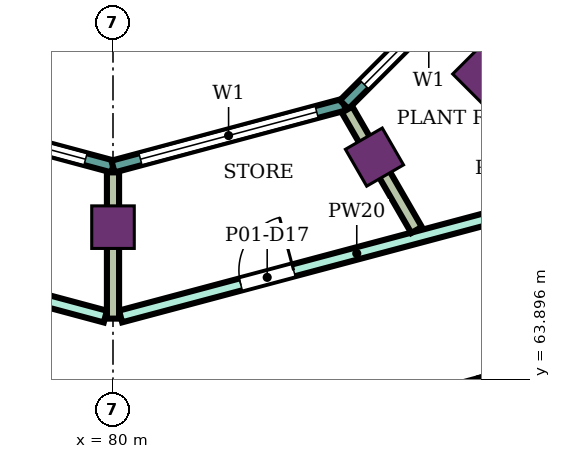
"""IFC4 building model, lengths in metres.
Left out: names, types, materials, properties, quantities, classifications, styles, units other than length and angle.
Written with IfcOpenShell. Run it as: python <this file> out.ifc"""

import sys

from ifc_helpers import new_model, si_unit, direction, frame, frame_2d, origin, origin_2d, place, context, subcontext, project, spatial, rectangle, extrude, element, fill, save


model = new_model("IFC4")
c1 = context("Model", 3, precision=1e-05, world=origin(), true_north=direction((0.0, 1.0)))
c2 = subcontext(c1, "Body", "Model", "MODEL_VIEW")
j1 = project(units=[si_unit("LENGTHUNIT", "METRE"), si_unit("PLANEANGLEUNIT", "RADIAN")], contexts=[c1])
p1 = place(None, origin())
s1 = spatial("IfcSite", under=j1, at=p1, CompositionType="ELEMENT")
p2 = place(p1, origin())
s2 = spatial("IfcBuilding", under=s1, at=p2, CompositionType="ELEMENT")
p3 = place(p2, frame((0.0, 0.0, 270.9)))
s3 = spatial("IfcBuildingStorey", under=s2, at=p3, CompositionType="ELEMENT", Elevation=270.9)
for number, where, z_axis, x_axis in (
    (1, (80.0, 66.4, 0.0), (0.0, 0.0, 1.0), (0.0, -1.0, 0.0)),
    (2, (84.3, 67.552, 0.0), (0.0, 0.0, 1.0), (0.5, -0.866, 0.0)),
    (3, (86.081, 68.919, 0.0), (0.0, 0.0, 1.0), (0.707, -0.707, 0.0)),
):
    element("IfcColumn", number, at=place(p3, frame(where, z_axis=z_axis, x_axis=x_axis)), inside=s3, PredefinedType="COLUMN", context=c2, shape_type="SweptSolid", body=[
        extrude(rectangle(XDim=0.7, YDim=0.7, at=origin_2d()), origin(), (0.0, 0.0, 1.0), 4.8),
    ])
p4 = place(p3, frame((76.198, 68.415, 0.0), z_axis=(0.0, 0.0, 1.0), x_axis=(0.965933654434, -0.258789828301, 0.0)))
e4 = element("IfcWall", 4, at=p4, inside=s3, PredefinedType="NOTDEFINED", context=c2, shape_type="SweptSolid", body=[
    extrude(rectangle(XDim=3.936, YDim=0.2, at=frame_2d((1.968, 0.0))), origin(), (0.0, 0.0, 1.0), 4.8),
])
p5 = place(p4, frame((0.468, 0.0, 0.9)))
e5 = element("IfcOpeningElement", 5, at=p5, cuts=e4, PredefinedType="OPENING", context=c2, shape_type="SweptSolid", body=[
    extrude(rectangle(XDim=3.0, YDim=2.3, at=frame_2d((1.5, 1.15))), frame((0.0, 0.11, 0.0), z_axis=(0.0, -1.0, 0.0), x_axis=(1.0, 0.0, 0.0)), (0.0, 0.0, 1.0), 0.22),
])
p6 = place(p3, frame((80.0, 67.396, 0.0), z_axis=(0.0, 0.0, 1.0), x_axis=(0.965933654434, 0.258789828301, 0.0)))
e6 = element("IfcWall", 6, at=p6, inside=s3, PredefinedType="NOTDEFINED", context=c2, shape_type="SweptSolid", body=[
    extrude(rectangle(XDim=3.936, YDim=0.2, at=frame_2d((1.968, 0.0))), origin(), (0.0, 0.0, 1.0), 4.8),
])
p7 = place(p6, frame((0.468, 0.0, 0.9)))
e7 = element("IfcOpeningElement", 7, at=p7, cuts=e6, PredefinedType="OPENING", context=c2, shape_type="SweptSolid", body=[
    extrude(rectangle(XDim=3.0, YDim=2.3, at=frame_2d((1.5, 1.15))), frame((0.0, 0.11, 0.0), z_axis=(0.0, -1.0, 0.0), x_axis=(1.0, 0.0, 0.0)), (0.0, 0.0, 1.0), 0.22),
])
p8 = place(p3, frame((83.802, 68.415, 0.0), z_axis=(0.0, 0.0, 1.0), x_axis=(0.707106781187, 0.707106781187, 0.0)))
e8 = element("IfcWall", 8, at=p8, inside=s3, PredefinedType="NOTDEFINED", context=c2, shape_type="SweptSolid", body=[
    extrude(rectangle(XDim=3.936, YDim=0.2, at=frame_2d((1.968, 0.0))), origin(), (0.0, 0.0, 1.0), 4.8),
])
p9 = place(p8, frame((0.468, 0.0, 0.9)))
e9 = element("IfcOpeningElement", 9, at=p9, cuts=e8, PredefinedType="OPENING", context=c2, shape_type="SweptSolid", body=[
    extrude(rectangle(XDim=3.0, YDim=2.3, at=frame_2d((1.5, 1.15))), frame((0.0, 0.11, 0.0), z_axis=(0.0, -1.0, 0.0), x_axis=(1.0, 0.0, 0.0)), (0.0, 0.0, 1.0), 0.22),
])
p10 = place(p3, frame((73.947, 63.826, 0.0), z_axis=(0.0, 0.0, 1.0), x_axis=(0.965898432367, -0.258921258979, 0.0)))
e10 = element("IfcWall", 10, at=p10, inside=s3, PredefinedType="PARTITIONING", context=c2, shape_type="SweptSolid", body=[
    extrude(rectangle(XDim=6.217, YDim=0.2, at=frame_2d((3.108, 0.0))), origin(), (0.0, 0.0, 1.0), 4.35),
])
p11 = place(p10, frame((1.037, 0.0, 0.0)))
e11 = element("IfcOpeningElement", 11, at=p11, cuts=e10, PredefinedType="OPENING", context=c2, shape_type="SweptSolid", body=[
    extrude(rectangle(XDim=0.9, YDim=2.1, at=frame_2d((0.45, 1.05))), frame((0.0, 0.11, 0.0), z_axis=(0.0, -1.0, 0.0), x_axis=(1.0, 0.0, 0.0)), (0.0, 0.0, 1.0), 0.22),
])
p12 = place(p3, frame((74.603, 66.342, 0.0), z_axis=(0.0, 0.0, 1.0), x_axis=(0.965920893652, -0.258837453254, 0.0)))
e12 = element("IfcWall", 12, at=p12, inside=s3, PredefinedType="PARTITIONING", context=c2, shape_type="SweptSolid", body=[
    extrude(rectangle(XDim=5.458, YDim=0.2, at=frame_2d((2.729, 0.0))), origin(), (0.0, 0.0, 1.0), 4.35),
])
p13 = place(p12, frame((2.512, 0.0, 0.0)))
e13 = element("IfcOpeningElement", 13, at=p13, cuts=e12, PredefinedType="OPENING", context=c2, shape_type="SweptSolid", body=[
    extrude(rectangle(XDim=0.9, YDim=2.1, at=frame_2d((0.45, 1.05))), frame((0.0, 0.11, 0.0), z_axis=(0.0, -1.0, 0.0), x_axis=(1.0, 0.0, 0.0)), (0.0, 0.0, 1.0), 0.22),
])
p14 = place(p3, frame((80.125, 64.932, 0.0), z_axis=(0.0, 0.0, 1.0), x_axis=(0.966236955806, 0.257655089674, 0.0)))
e14 = element("IfcWall", 14, at=p14, inside=s3, PredefinedType="PARTITIONING", context=c2, shape_type="SweptSolid", body=[
    extrude(rectangle(XDim=8.039, YDim=0.2, at=frame_2d((4.02, 0.0))), origin(), (0.0, 0.0, 1.0), 4.35),
])
p15 = place(p14, frame((6.298, 0.0, 0.0)))
e15 = element("IfcOpeningElement", 15, at=p15, cuts=e14, PredefinedType="OPENING", context=c2, shape_type="SweptSolid", body=[
    extrude(rectangle(XDim=0.9, YDim=2.1, at=frame_2d((0.45, 1.05))), frame((0.0, 0.11, 0.0), z_axis=(0.0, -1.0, 0.0), x_axis=(1.0, 0.0, 0.0)), (0.0, 0.0, 1.0), 0.22),
])
p16 = place(p14, frame((2.045, 0.0, 0.0)))
e16 = element("IfcOpeningElement", 16, at=p16, cuts=e14, PredefinedType="OPENING", context=c2, shape_type="SweptSolid", body=[
    extrude(rectangle(XDim=0.9, YDim=2.1, at=frame_2d((0.45, 1.05))), frame((0.0, 0.11, 0.0), z_axis=(0.0, -1.0, 0.0), x_axis=(1.0, 0.0, 0.0)), (0.0, 0.0, 1.0), 0.22),
])
p17 = place(p3, frame((80.0, 62.204, 0.0), z_axis=(0.0, 0.0, 1.0), x_axis=(0.965938139786, 0.258773086132, 0.0)))
e17 = element("IfcWall", 17, at=p17, inside=s3, PredefinedType="PARTITIONING", context=c2, shape_type="SweptSolid", body=[
    extrude(rectangle(XDim=6.266, YDim=0.2, at=frame_2d((3.133, 0.0))), origin(), (0.0, 0.0, 1.0), 4.35),
])
p18 = place(p17, frame((2.233, 0.0, 0.0)))
e18 = element("IfcOpeningElement", 18, at=p18, cuts=e17, PredefinedType="OPENING", context=c2, shape_type="SweptSolid", body=[
    extrude(rectangle(XDim=1.8, YDim=2.1, at=frame_2d((0.9, 1.05))), frame((0.0, 0.11, 0.0), z_axis=(0.0, -1.0, 0.0), x_axis=(1.0, 0.0, 0.0)), (0.0, 0.0, 1.0), 0.22),
])
p19 = place(p3, frame((80.0, 64.896, 0.0), z_axis=(0.0, 0.0, 1.0), x_axis=(0.0, 1.0, 0.0)))
e19 = element("IfcWall", 19, at=p19, inside=s3, PredefinedType="PARTITIONING", context=c2, shape_type="SweptSolid", body=[
    extrude(rectangle(XDim=2.405, YDim=0.2, at=frame_2d((1.203, 0.0))), origin(), (0.0, 0.0, 1.0), 3.08),
])
p20 = place(p3, frame((83.85, 68.333, 0.0), z_axis=(0.0, 0.0, 1.0), x_axis=(0.499953638813, -0.866052168773, 0.0)))
e20 = element("IfcWall", 20, at=p20, inside=s3, PredefinedType="PARTITIONING", context=c2, shape_type="SweptSolid", body=[
    extrude(rectangle(XDim=2.285, YDim=0.2, at=frame_2d((1.143, 0.0))), origin(), (0.0, 0.0, 1.0), 3.08),
])
p21 = place(p3, frame((86.053, 63.826, 0.0), z_axis=(0.0, 0.0, 1.0), x_axis=(0.969450593176, 0.245286663704, 0.0)))
e21 = element("IfcWall", 21, at=p21, inside=s3, PredefinedType="PARTITIONING", context=c2, shape_type="SweptSolid", body=[
    extrude(rectangle(XDim=5.907, YDim=0.2, at=frame_2d((2.954, 0.0))), origin(), (0.0, 0.0, 1.0), 4.35),
])
p22 = place(p21, frame((1.389, 0.0, 0.0)))
e22 = element("IfcOpeningElement", 22, at=p22, cuts=e21, PredefinedType="OPENING", context=c2, shape_type="SweptSolid", body=[
    extrude(rectangle(XDim=1.8, YDim=2.1, at=frame_2d((0.9, 1.05))), frame((0.0, 0.11, 0.0), z_axis=(0.0, -1.0, 0.0), x_axis=(1.0, 0.0, 0.0)), (0.0, 0.0, 1.0), 0.22),
])
p23 = place(p5, origin())
e23 = element("IfcWindow", 23, at=p23, inside=s3, PartitioningType="SINGLE_PANEL", PredefinedType="WINDOW", context=c2, shape_type="SweptSolid", body=[
    extrude(rectangle(XDim=3.0, YDim=2.3, at=frame_2d((1.5, 1.15))), frame((0.0, 0.03, 0.0), z_axis=(0.0, -1.0, 0.0), x_axis=(1.0, 0.0, 0.0)), (0.0, 0.0, 1.0), 0.06),
])
fill(e5, e23)
p24 = place(p7, origin())
e24 = element("IfcWindow", 24, at=p24, inside=s3, PartitioningType="SINGLE_PANEL", PredefinedType="WINDOW", context=c2, shape_type="SweptSolid", body=[
    extrude(rectangle(XDim=3.0, YDim=2.3, at=frame_2d((1.5, 1.15))), frame((0.0, 0.03, 0.0), z_axis=(0.0, -1.0, 0.0), x_axis=(1.0, 0.0, 0.0)), (0.0, 0.0, 1.0), 0.06),
])
fill(e7, e24)
p25 = place(p9, origin())
e25 = element("IfcWindow", 25, at=p25, inside=s3, PartitioningType="SINGLE_PANEL", PredefinedType="WINDOW", context=c2, shape_type="SweptSolid", body=[
    extrude(rectangle(XDim=3.0, YDim=2.3, at=frame_2d((1.5, 1.15))), frame((0.0, 0.03, 0.0), z_axis=(0.0, -1.0, 0.0), x_axis=(1.0, 0.0, 0.0)), (0.0, 0.0, 1.0), 0.06),
])
fill(e9, e25)
p26 = place(p16, origin())
e26 = element("IfcDoor", 26, at=p26, inside=s3, OperationType="SINGLE_SWING_RIGHT", PredefinedType="DOOR", context=c2, shape_type="SweptSolid", body=[
    extrude(rectangle(XDim=0.9, YDim=2.1, at=frame_2d((0.45, 1.05))), frame((0.0, 0.025, 0.0), z_axis=(0.0, -1.0, 0.0), x_axis=(1.0, 0.0, 0.0)), (0.0, 0.0, 1.0), 0.05),
])
fill(e16, e26)
save(model, sys.argv[1])
